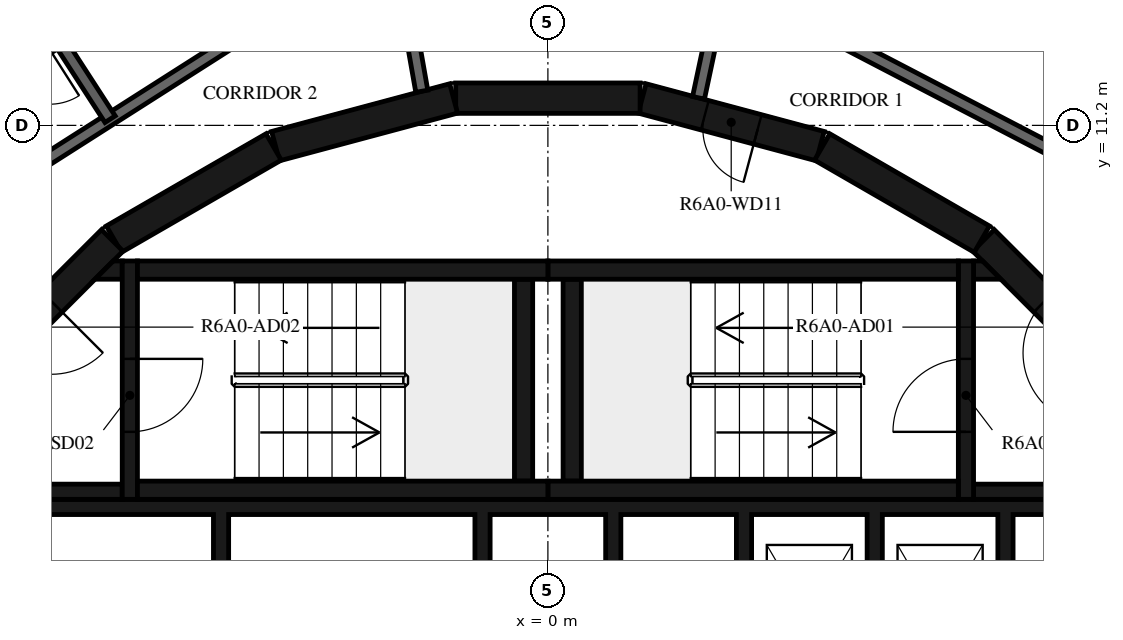
"""IFC4 building model, lengths in metres.
Left out: names, types, materials, properties, quantities, classifications, styles, units other than length and angle.
Written with IfcOpenShell. Run it as: python <this file> out.ifc"""

import sys

from ifc_helpers import new_model, si_unit, direction, frame, frame_2d, origin, place, context, subcontext, project, spatial, polyline, rectangle, outline, extrude, element, fill, save


model = new_model("IFC4")
c1 = context("Model", 3, precision=1e-05, world=origin(), true_north=direction((0.0, 1.0)))
c2 = subcontext(c1, "Body", "Model", "MODEL_VIEW")
j1 = project(units=[si_unit("LENGTHUNIT", "METRE"), si_unit("PLANEANGLEUNIT", "RADIAN")], contexts=[c1])
p1 = place(None, origin())
s1 = spatial("IfcSite", under=j1, at=p1, CompositionType="ELEMENT")
p2 = place(p1, origin())
s2 = spatial("IfcBuilding", under=s1, at=p2, CompositionType="ELEMENT")
p3 = place(p2, frame((0.0, 0.0, 233.7)))
s3 = spatial("IfcBuildingStorey", under=s2, at=p3, CompositionType="ELEMENT", Elevation=233.7)
p4 = place(p3, frame((9.308, 7.164, 0.0), z_axis=(0.0, 0.0, 1.0), x_axis=(-0.707106781187, 0.707106781187, 0.0)))
e1 = element("IfcWall", 1, at=p4, inside=s3, PredefinedType="SHEAR", context=c2, shape_type="SweptSolid", body=[
    extrude(rectangle(XDim=3.032, YDim=0.5, at=frame_2d((1.516, 0.0))), origin(), (0.0, 0.0, 1.0), 3.12),
])
p5 = place(p4, frame((0.416, 0.0, 0.0)))
e2 = element("IfcOpeningElement", 2, at=p5, cuts=e1, PredefinedType="OPENING", context=c2, shape_type="SweptSolid", body=[
    extrude(rectangle(XDim=1.2, YDim=2.1, at=frame_2d((0.6, 1.05))), frame((0.0, 0.26, 0.0), z_axis=(0.0, -1.0, 0.0), x_axis=(1.0, 0.0, 0.0)), (0.0, 0.0, 1.0), 0.52),
])
p6 = place(p3, frame((7.137, 9.329, 0.0), z_axis=(0.0, 0.0, 1.0), x_axis=(-0.865975092491, 0.500087131594, 0.0)))
e3 = element("IfcWall", 3, at=p6, inside=s3, PredefinedType="SHEAR", context=c2, shape_type="SweptSolid", body=[
    extrude(rectangle(XDim=3.033, YDim=0.5, at=frame_2d((1.516, 0.0))), origin(), (0.0, 0.0, 1.0), 3.12),
])
p7 = place(p3, frame((4.479, 10.858, 0.0), z_axis=(0.0, 0.0, 1.0), x_axis=(-0.965948410781, 0.258734743916, 0.0)))
e4 = element("IfcWall", 4, at=p7, inside=s3, PredefinedType="SHEAR", context=c2, shape_type="SweptSolid", body=[
    extrude(rectangle(XDim=3.033, YDim=0.5, at=frame_2d((1.516, 0.0))), origin(), (0.0, 0.0, 1.0), 3.12),
])
p8 = place(p7, frame((1.066, 0.0, 0.0)))
e5 = element("IfcOpeningElement", 5, at=p8, cuts=e4, PredefinedType="OPENING", context=c2, shape_type="SweptSolid", body=[
    extrude(rectangle(XDim=0.9, YDim=2.1, at=frame_2d((0.45, 1.05))), frame((0.0, 0.26, 0.0), z_axis=(0.0, -1.0, 0.0), x_axis=(1.0, 0.0, 0.0)), (0.0, 0.0, 1.0), 0.52),
])
for number, where, z_axis, x_axis in (
    (6, (1.516, 11.647, 0.0), (0.0, 0.0, 1.0), (-1.0, 0.0, 0.0)),
    (7, (-1.55, 11.643, 0.0), (0.0, 0.0, 1.0), (-0.966, -0.259, 0.0)),
    (8, (-4.51, 10.845, 0.0), (0.0, 0.0, 1.0), (-0.866, -0.5, 0.0)),
):
    element("IfcWall", number, at=place(p3, frame(where, z_axis=z_axis, x_axis=x_axis)), inside=s3, PredefinedType="SHEAR", context=c2, shape_type="SweptSolid", body=[
        extrude(rectangle(XDim=3.033, YDim=0.5, at=frame_2d((1.516, 0.0))), origin(), (0.0, 0.0, 1.0), 3.12),
    ])
p9 = place(p3, frame((-7.164, 9.308, 0.0), z_axis=(0.0, 0.0, 1.0), x_axis=(-0.707106781187, -0.707106781187, 0.0)))
e9 = element("IfcWall", 9, at=p9, inside=s3, PredefinedType="SHEAR", context=c2, shape_type="SweptSolid", body=[
    extrude(rectangle(XDim=3.032, YDim=0.5, at=frame_2d((1.516, 0.0))), origin(), (0.0, 0.0, 1.0), 3.12),
])
p10 = place(p9, frame((1.416, 0.0, 0.0)))
e10 = element("IfcOpeningElement", 10, at=p10, cuts=e9, PredefinedType="OPENING", context=c2, shape_type="SweptSolid", body=[
    extrude(rectangle(XDim=1.2, YDim=2.1, at=frame_2d((0.6, 1.05))), frame((0.0, 0.26, 0.0), z_axis=(0.0, -1.0, 0.0), x_axis=(1.0, 0.0, 0.0)), (0.0, 0.0, 1.0), 0.52),
])
for number, where, z_axis, x_axis in (
    (11, (0.0, 5.2, 0.0), (0.0, 0.0, 1.0), (1.0, 0.0, 0.0)),
    (12, (0.0, 8.82, 0.0), (0.0, 0.0, 1.0), (1.0, 0.0, 0.0)),
):
    element("IfcWall", number, at=place(p3, frame(where, z_axis=z_axis, x_axis=x_axis)), inside=s3, PredefinedType="SHEAR", context=c2, shape_type="SweptSolid", body=[
        extrude(rectangle(XDim=6.75, YDim=0.3, at=frame_2d((3.375, 0.0))), origin(), (0.0, 0.0, 1.0), 3.12),
    ])
p11 = place(p3, frame((0.4, 5.35, 0.0), z_axis=(0.0, 0.0, 1.0), x_axis=(0.0, 1.0, 0.0)))
e13 = element("IfcWall", 13, at=p11, inside=s3, PredefinedType="SHEAR", context=c2, shape_type="SweptSolid", body=[
    extrude(rectangle(XDim=3.32, YDim=0.3, at=frame_2d((1.66, 0.0))), origin(), (0.0, 0.0, 1.0), 3.12),
])
p12 = place(p3, frame((6.875, 5.05, 0.0), z_axis=(0.0, 0.0, 1.0), x_axis=(0.0, 1.0, 0.0)))
e14 = element("IfcWall", 14, at=p12, inside=s3, PredefinedType="SHEAR", context=c2, shape_type="SweptSolid", body=[
    extrude(rectangle(XDim=3.92, YDim=0.25, at=frame_2d((1.96, 0.0))), origin(), (0.0, 0.0, 1.0), 3.12),
])
p13 = place(p12, frame((1.11, 0.0, 0.0)))
e15 = element("IfcOpeningElement", 15, at=p13, cuts=e14, PredefinedType="OPENING", context=c2, shape_type="SweptSolid", body=[
    extrude(rectangle(XDim=1.2, YDim=2.1, at=frame_2d((0.6, 1.05))), frame((0.0, 0.135, 0.0), z_axis=(0.0, -1.0, 0.0), x_axis=(1.0, 0.0, 0.0)), (0.0, 0.0, 1.0), 0.27),
])
p14 = place(p3, frame((7.0, 5.175, 0.0), z_axis=(0.0, 0.0, 1.0), x_axis=(1.0, 0.0, 0.0)))
e16 = element("IfcWall", 16, at=p14, inside=s3, PredefinedType="SHEAR", context=c2, shape_type="SweptSolid", body=[
    extrude(rectangle(XDim=3.1, YDim=0.25, at=frame_2d((1.55, 0.0))), origin(), (0.0, 0.0, 1.0), 3.12),
])
p15 = place(p3, origin())
e17 = element("IfcWall", 17, at=p15, inside=s3, PredefinedType="SHEAR", context=c2, shape_type="SweptSolid", body=[
    extrude(outline(polyline([(7.448, 8.67), (7.0, 8.67), (7.0, 8.97), (7.148, 8.97), (7.448, 8.67)])), origin(), (0.0, 0.0, 1.0), 3.12),
])
for number, where, z_axis, x_axis in (
    (18, (-6.75, 5.2, 0.0), (0.0, 0.0, 1.0), (1.0, 0.0, 0.0)),
    (19, (-6.75, 8.82, 0.0), (0.0, 0.0, 1.0), (1.0, 0.0, 0.0)),
):
    element("IfcWall", number, at=place(p3, frame(where, z_axis=z_axis, x_axis=x_axis)), inside=s3, PredefinedType="SHEAR", context=c2, shape_type="SweptSolid", body=[
        extrude(rectangle(XDim=6.75, YDim=0.3, at=frame_2d((3.375, 0.0))), origin(), (0.0, 0.0, 1.0), 3.12),
    ])
p16 = place(p3, frame((-0.4, 5.35, 0.0), z_axis=(0.0, 0.0, 1.0), x_axis=(0.0, 1.0, 0.0)))
e20 = element("IfcWall", 20, at=p16, inside=s3, PredefinedType="SHEAR", context=c2, shape_type="SweptSolid", body=[
    extrude(rectangle(XDim=3.32, YDim=0.3, at=frame_2d((1.66, 0.0))), origin(), (0.0, 0.0, 1.0), 3.12),
])
p17 = place(p3, frame((-6.875, 8.97, 0.0), z_axis=(0.0, 0.0, 1.0), x_axis=(0.0, -1.0, 0.0)))
e21 = element("IfcWall", 21, at=p17, inside=s3, PredefinedType="SHEAR", context=c2, shape_type="SweptSolid", body=[
    extrude(rectangle(XDim=3.92, YDim=0.25, at=frame_2d((1.96, 0.0))), origin(), (0.0, 0.0, 1.0), 3.12),
])
p18 = place(p17, frame((1.61, 0.0, 0.0)))
e22 = element("IfcOpeningElement", 22, at=p18, cuts=e21, PredefinedType="OPENING", context=c2, shape_type="SweptSolid", body=[
    extrude(rectangle(XDim=1.2, YDim=2.1, at=frame_2d((0.6, 1.05))), frame((0.0, 0.135, 0.0), z_axis=(0.0, -1.0, 0.0), x_axis=(1.0, 0.0, 0.0)), (0.0, 0.0, 1.0), 0.27),
])
p19 = place(p3, frame((-7.0, 5.175, 0.0), z_axis=(0.0, 0.0, 1.0), x_axis=(-1.0, 0.0, 0.0)))
e23 = element("IfcWall", 23, at=p19, inside=s3, PredefinedType="SHEAR", context=c2, shape_type="SweptSolid", body=[
    extrude(rectangle(XDim=3.1, YDim=0.25, at=frame_2d((1.55, 0.0))), origin(), (0.0, 0.0, 1.0), 3.12),
])
p20 = place(p3, origin())
e24 = element("IfcWall", 24, at=p20, inside=s3, PredefinedType="SHEAR", context=c2, shape_type="SweptSolid", body=[
    extrude(outline(polyline([(-7.148, 8.97), (-7.0, 8.97), (-7.0, 8.67), (-7.448, 8.67), (-7.148, 8.97)])), origin(), (0.0, 0.0, 1.0), 3.12),
])
p21 = place(p3, origin())
e25 = element("IfcWall", 25, at=p21, inside=s3, PredefinedType="SHEAR", context=c2, shape_type="SweptSolid", body=[
    extrude(outline(polyline([(-9.55, 4.8), (-5.5, 4.8), (-5.5, 1.9), (-5.25, 1.9), (-5.25, 4.8), (-1.2, 4.8), (-1.2, 1.9), (-0.95, 1.9), (-0.95, 4.8), (0.95, 4.8), (0.95, 1.9), (1.2, 1.9), (1.2, 4.8), (3.1, 4.8), (3.1, 1.9), (3.35, 1.9), (3.35, 4.8), (5.25, 4.8), (5.25, 1.9), (5.5, 1.9), (5.5, 4.8), (7.4, 4.8), (7.4, 1.9), (7.65, 1.9), (7.65, 4.8), (9.55, 4.8), (9.55, 1.9), (9.8, 1.9), (9.8, 4.8), (9.8, 5.05), (-9.8, 5.05), (-9.8, 4.8), (-9.8, 1.9), (-9.55, 1.9), (-9.55, 4.8)])), origin(), (0.0, 0.0, 1.0), 3.12),
])
p22 = place(p3, frame((9.372, 10.228, 0.0), z_axis=(0.0, 0.0, 1.0), x_axis=(-0.887005184532, 0.461759464021, 0.0)))
e26 = element("IfcWall", 26, at=p22, inside=s3, PredefinedType="STANDARD", context=c2, shape_type="SweptSolid", body=[
    extrude(rectangle(XDim=7.181, YDim=0.2, at=frame_2d((3.591, 0.0))), origin(), (0.0, 0.0, 1.0), 3.12),
])
p23 = place(p3, frame((2.878, 13.538, 0.0), z_axis=(0.0, 0.0, 1.0), x_axis=(-0.207893604596, -0.978151444904, 0.0)))
e27 = element("IfcWall", 27, at=p23, inside=s3, PredefinedType="STANDARD", context=c2, shape_type="SweptSolid", body=[
    extrude(rectangle(XDim=1.927, YDim=0.2, at=frame_2d((0.963, 0.0))), origin(), (0.0, 0.0, 1.0), 3.12),
])
p24 = place(p3, frame((-2.074, 11.761, 0.0), z_axis=(0.0, 0.0, 1.0), x_axis=(-0.173679082312, 0.984802303189, 0.0)))
e28 = element("IfcWall", 28, at=p24, inside=s3, PredefinedType="STANDARD", context=c2, shape_type="SweptSolid", body=[
    extrude(rectangle(XDim=1.573, YDim=0.2, at=frame_2d((0.787, 0.0))), origin(), (0.0, 0.0, 1.0), 3.12),
])
p25 = place(p3, frame((-4.172, 13.231, 0.0), z_axis=(0.0, 0.0, 1.0), x_axis=(-0.843388394728, -0.537304397561, 0.0)))
e29 = element("IfcWall", 29, at=p25, inside=s3, PredefinedType="STANDARD", context=c2, shape_type="SweptSolid", body=[
    extrude(rectangle(XDim=7.181, YDim=0.2, at=frame_2d((3.59, 0.0))), origin(), (0.0, 0.0, 1.0), 3.12),
])
p26 = place(p3, frame((-8.738, 13.677, 0.0), z_axis=(0.0, 0.0, 1.0), x_axis=(0.54358037296, -0.839357121929, 0.0)))
e30 = element("IfcWall", 30, at=p26, inside=s3, PredefinedType="STANDARD", context=c2, shape_type="SweptSolid", body=[
    extrude(rectangle(XDim=2.83, YDim=0.2, at=frame_2d((1.415, 0.0))), origin(), (0.0, 0.0, 1.0), 3.12),
])
p27 = place(p3, frame((10.421, 11.373, 0.0), z_axis=(0.0, 0.0, 1.0), x_axis=(-0.887012970857, 0.461744506769, 0.0)))
e31 = element("IfcWall", 31, at=p27, inside=s3, PredefinedType="PARTITIONING", context=c2, shape_type="SweptSolid", body=[
    extrude(rectangle(XDim=7.985, YDim=0.12, at=frame_2d((3.992, 0.0))), origin(), (0.0, 0.0, 1.0), 3.12),
])
p28 = place(p27, frame((5.448, 0.0, 0.0)))
e32 = element("IfcOpeningElement", 32, at=p28, cuts=e31, PredefinedType="OPENING", context=c2, shape_type="SweptSolid", body=[
    extrude(rectangle(XDim=0.9, YDim=2.1, at=frame_2d((0.45, 1.05))), frame((0.0, 0.07, 0.0), z_axis=(0.0, -1.0, 0.0), x_axis=(1.0, 0.0, 0.0)), (0.0, 0.0, 1.0), 0.14),
])
p29 = place(p3, frame((-8.023, 12.555, 0.0), z_axis=(0.0, 0.0, 1.0), x_axis=(-0.843408270233, -0.537273198385, 0.0)))
e33 = element("IfcWall", 33, at=p29, inside=s3, PredefinedType="PARTITIONING", context=c2, shape_type="SweptSolid", body=[
    extrude(rectangle(XDim=3.971, YDim=0.12, at=frame_2d((1.986, 0.0))), origin(), (0.0, 0.0, 1.0), 3.12),
])
p30 = place(p29, frame((0.2, 0.0, 0.0)))
e34 = element("IfcOpeningElement", 34, at=p30, cuts=e33, PredefinedType="OPENING", context=c2, shape_type="SweptSolid", body=[
    extrude(rectangle(XDim=0.9, YDim=2.1, at=frame_2d((0.45, 1.05))), frame((0.0, 0.07, 0.0), z_axis=(0.0, -1.0, 0.0), x_axis=(1.0, 0.0, 0.0)), (0.0, 0.0, 1.0), 0.14),
])
p31 = place(p13, origin())
e35 = element("IfcDoor", 35, at=p31, inside=s3, OperationType="SINGLE_SWING_LEFT", PredefinedType="DOOR", context=c2, shape_type="SweptSolid", body=[
    extrude(rectangle(XDim=1.2, YDim=2.1, at=frame_2d((0.6, 1.05))), frame((0.0, 0.025, 0.0), z_axis=(0.0, -1.0, 0.0), x_axis=(1.0, 0.0, 0.0)), (0.0, 0.0, 1.0), 0.05),
])
fill(e15, e35)
p32 = place(p5, origin())
e36 = element("IfcDoor", 36, at=p32, inside=s3, OperationType="SINGLE_SWING_RIGHT", PredefinedType="DOOR", context=c2, shape_type="SweptSolid", body=[
    extrude(rectangle(XDim=1.2, YDim=2.1, at=frame_2d((0.6, 1.05))), frame((0.0, 0.025, 0.0), z_axis=(0.0, -1.0, 0.0), x_axis=(1.0, 0.0, 0.0)), (0.0, 0.0, 1.0), 0.05),
])
fill(e2, e36)
p33 = place(p18, origin())
e37 = element("IfcDoor", 37, at=p33, inside=s3, OperationType="SINGLE_SWING_LEFT", PredefinedType="DOOR", context=c2, shape_type="SweptSolid", body=[
    extrude(rectangle(XDim=1.2, YDim=2.1, at=frame_2d((0.6, 1.05))), frame((0.0, 0.025, 0.0), z_axis=(0.0, -1.0, 0.0), x_axis=(1.0, 0.0, 0.0)), (0.0, 0.0, 1.0), 0.05),
])
fill(e22, e37)
p34 = place(p10, origin())
e38 = element("IfcDoor", 38, at=p34, inside=s3, OperationType="SINGLE_SWING_RIGHT", PredefinedType="DOOR", context=c2, shape_type="SweptSolid", body=[
    extrude(rectangle(XDim=1.2, YDim=2.1, at=frame_2d((0.6, 1.05))), frame((0.0, 0.025, 0.0), z_axis=(0.0, -1.0, 0.0), x_axis=(1.0, 0.0, 0.0)), (0.0, 0.0, 1.0), 0.05),
])
fill(e10, e38)
p35 = place(p8, origin())
e39 = element("IfcDoor", 39, at=p35, inside=s3, OperationType="SINGLE_SWING_LEFT", PredefinedType="DOOR", context=c2, shape_type="SweptSolid", body=[
    extrude(rectangle(XDim=0.9, YDim=2.1, at=frame_2d((0.45, 1.05))), frame((0.0, 0.025, 0.0), z_axis=(0.0, -1.0, 0.0), x_axis=(1.0, 0.0, 0.0)), (0.0, 0.0, 1.0), 0.05),
])
fill(e5, e39)
save(model, sys.argv[1])
